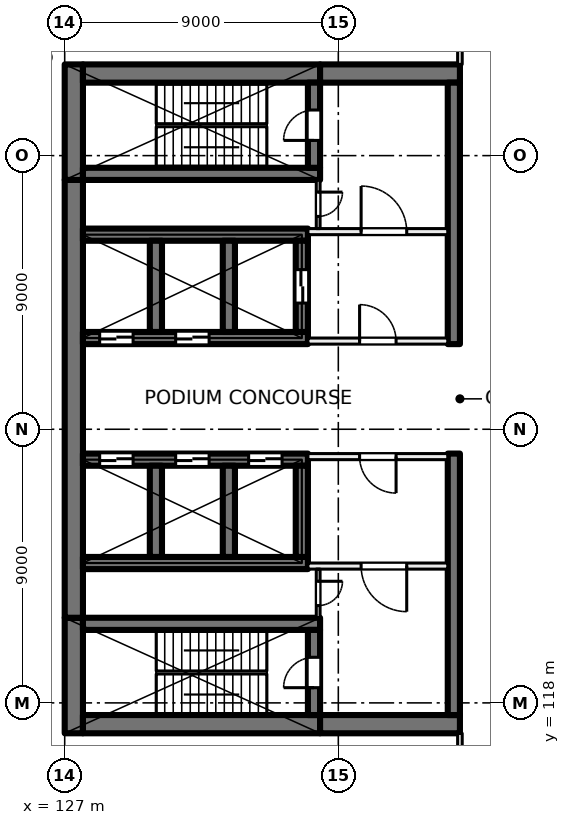
"""IFC4 building model, lengths in metres.
Left out: names, types, materials, properties, quantities, classifications, styles, units other than length and angle.
Written with IfcOpenShell. Run it as: python <this file> out.ifc"""

import sys

from ifc_helpers import new_model, si_unit, direction, frame, frame_2d, origin, place, context, subcontext, project, spatial, rectangle, extrude, element, fill, save


model = new_model("IFC4")
c1 = context("Model", 3, precision=1e-05, world=origin(), true_north=direction((0.0, 1.0)))
c2 = subcontext(c1, "Body", "Model", "MODEL_VIEW")
j1 = project(units=[si_unit("LENGTHUNIT", "METRE"), si_unit("PLANEANGLEUNIT", "RADIAN")], contexts=[c1])
p1 = place(None, origin())
s1 = spatial("IfcSite", under=j1, at=p1, CompositionType="ELEMENT")
p2 = place(p1, origin())
s2 = spatial("IfcBuilding", under=s1, at=p2, CompositionType="ELEMENT")
p3 = place(p2, frame((0.0, 0.0, 17.5)))
s3 = spatial("IfcBuildingStorey", under=s2, at=p3, CompositionType="ELEMENT", Elevation=17.5)
p4 = place(p3, frame((127.3, 117.0, 0.0), z_axis=(0.0, 0.0, 1.0), x_axis=(0.0, 1.0, 0.0)))
e1 = element("IfcWall", 1, at=p4, inside=s3, PredefinedType="SHEAR", context=c2, shape_type="SweptSolid", body=[
    extrude(rectangle(XDim=3.8, YDim=0.6, at=frame_2d((1.9, 0.0))), origin(), (0.0, 0.0, 1.0), 5.0),
])
p5 = place(p3, frame((127.3, 120.8, 0.0), z_axis=(0.0, 0.0, 1.0), x_axis=(0.0, 1.0, 0.0)))
e2 = element("IfcWall", 2, at=p5, inside=s3, PredefinedType="SHEAR", context=c2, shape_type="SweptSolid", body=[
    extrude(rectangle(XDim=14.4, YDim=0.6, at=frame_2d((7.2, 0.0))), origin(), (0.0, 0.0, 1.0), 5.0),
])
p6 = place(p3, frame((127.3, 135.2, 0.0), z_axis=(0.0, 0.0, 1.0), x_axis=(0.0, 1.0, 0.0)))
e3 = element("IfcWall", 3, at=p6, inside=s3, PredefinedType="SHEAR", context=c2, shape_type="SweptSolid", body=[
    extrude(rectangle(XDim=3.8, YDim=0.6, at=frame_2d((1.9, 0.0))), origin(), (0.0, 0.0, 1.0), 5.0),
])
for number, where, z_axis, x_axis in (
    (4, (127.6, 117.3, 0.0), (0.0, 0.0, 1.0), (1.0, 0.0, 0.0)),
    (5, (127.6, 138.7, 0.0), (0.0, 0.0, 1.0), (1.0, 0.0, 0.0)),
):
    element("IfcWall", number, at=place(p3, frame(where, z_axis=z_axis, x_axis=x_axis)), inside=s3, PredefinedType="SHEAR", context=c2, shape_type="SweptSolid", body=[
        extrude(rectangle(XDim=7.8, YDim=0.6, at=frame_2d((3.9, 0.0))), origin(), (0.0, 0.0, 1.0), 5.0),
    ])
for number, where, z_axis, x_axis in (
    (6, (135.4, 117.3, 0.0), (0.0, 0.0, 1.0), (1.0, 0.0, 0.0)),
    (7, (135.4, 138.7, 0.0), (0.0, 0.0, 1.0), (1.0, 0.0, 0.0)),
):
    element("IfcWall", number, at=place(p3, frame(where, z_axis=z_axis, x_axis=x_axis)), inside=s3, PredefinedType="SHEAR", context=c2, shape_type="SweptSolid", body=[
        extrude(rectangle(XDim=4.6, YDim=0.6, at=frame_2d((2.3, 0.0))), origin(), (0.0, 0.0, 1.0), 5.0),
    ])
p7 = place(p3, frame((127.6, 120.6, 0.0), z_axis=(0.0, 0.0, 1.0), x_axis=(1.0, 0.0, 0.0)))
e8 = element("IfcWall", 8, at=p7, inside=s3, PredefinedType="SHEAR", context=c2, shape_type="SweptSolid", body=[
    extrude(rectangle(XDim=7.8, YDim=0.4, at=frame_2d((3.9, 0.0))), origin(), (0.0, 0.0, 1.0), 5.0),
])
p8 = place(p3, frame((135.2, 117.6, 0.0), z_axis=(0.0, 0.0, 1.0), x_axis=(0.0, 1.0, 0.0)))
e9 = element("IfcWall", 9, at=p8, inside=s3, PredefinedType="SHEAR", context=c2, shape_type="SweptSolid", body=[
    extrude(rectangle(XDim=2.8, YDim=0.4, at=frame_2d((1.4, 0.0))), origin(), (0.0, 0.0, 1.0), 5.0),
])
p9 = place(p8, frame((0.9, 0.0, 0.0)))
e10 = element("IfcOpeningElement", 10, at=p9, cuts=e9, PredefinedType="OPENING", context=c2, shape_type="SweptSolid", body=[
    extrude(rectangle(XDim=1.0, YDim=2.1, at=frame_2d((0.5, 1.05))), frame((0.0, 0.21, 0.0), z_axis=(0.0, -1.0, 0.0), x_axis=(1.0, 0.0, 0.0)), (0.0, 0.0, 1.0), 0.42),
])
p10 = place(p3, frame((127.6, 135.4, 0.0), z_axis=(0.0, 0.0, 1.0), x_axis=(1.0, 0.0, 0.0)))
e11 = element("IfcWall", 11, at=p10, inside=s3, PredefinedType="SHEAR", context=c2, shape_type="SweptSolid", body=[
    extrude(rectangle(XDim=7.8, YDim=0.4, at=frame_2d((3.9, 0.0))), origin(), (0.0, 0.0, 1.0), 5.0),
])
p11 = place(p3, frame((135.2, 135.6, 0.0), z_axis=(0.0, 0.0, 1.0), x_axis=(0.0, 1.0, 0.0)))
e12 = element("IfcWall", 12, at=p11, inside=s3, PredefinedType="SHEAR", context=c2, shape_type="SweptSolid", body=[
    extrude(rectangle(XDim=2.8, YDim=0.4, at=frame_2d((1.4, 0.0))), origin(), (0.0, 0.0, 1.0), 5.0),
])
p12 = place(p11, frame((0.9, 0.0, 0.0)))
e13 = element("IfcOpeningElement", 13, at=p12, cuts=e12, PredefinedType="OPENING", context=c2, shape_type="SweptSolid", body=[
    extrude(rectangle(XDim=1.0, YDim=2.1, at=frame_2d((0.5, 1.05))), frame((0.0, 0.21, 0.0), z_axis=(0.0, -1.0, 0.0), x_axis=(1.0, 0.0, 0.0)), (0.0, 0.0, 1.0), 0.42),
])
p13 = place(p3, frame((127.6, 126.0, 0.0), z_axis=(0.0, 0.0, 1.0), x_axis=(1.0, 0.0, 0.0)))
e14 = element("IfcWall", 14, at=p13, inside=s3, PredefinedType="SHEAR", context=c2, shape_type="SweptSolid", body=[
    extrude(rectangle(XDim=7.4, YDim=0.4, at=frame_2d((3.7, 0.0))), origin(), (0.0, 0.0, 1.0), 5.0),
])
p14 = place(p13, frame((0.55, 0.0, 0.0)))
e15 = element("IfcOpeningElement", 15, at=p14, cuts=e14, PredefinedType="OPENING", context=c2, shape_type="SweptSolid", body=[
    extrude(rectangle(XDim=1.1, YDim=2.1, at=frame_2d((0.55, 1.05))), frame((0.0, 0.21, 0.0), z_axis=(0.0, -1.0, 0.0), x_axis=(1.0, 0.0, 0.0)), (0.0, 0.0, 1.0), 0.42),
])
p15 = place(p13, frame((3.05, 0.0, 0.0)))
e16 = element("IfcOpeningElement", 16, at=p15, cuts=e14, PredefinedType="OPENING", context=c2, shape_type="SweptSolid", body=[
    extrude(rectangle(XDim=1.1, YDim=2.1, at=frame_2d((0.55, 1.05))), frame((0.0, 0.21, 0.0), z_axis=(0.0, -1.0, 0.0), x_axis=(1.0, 0.0, 0.0)), (0.0, 0.0, 1.0), 0.42),
])
p16 = place(p13, frame((5.45, 0.0, 0.0)))
e17 = element("IfcOpeningElement", 17, at=p16, cuts=e14, PredefinedType="OPENING", context=c2, shape_type="SweptSolid", body=[
    extrude(rectangle(XDim=1.1, YDim=2.1, at=frame_2d((0.55, 1.05))), frame((0.0, 0.21, 0.0), z_axis=(0.0, -1.0, 0.0), x_axis=(1.0, 0.0, 0.0)), (0.0, 0.0, 1.0), 0.42),
])
p17 = place(p3, frame((127.6, 122.6, 0.0), z_axis=(0.0, 0.0, 1.0), x_axis=(1.0, 0.0, 0.0)))
e18 = element("IfcWall", 18, at=p17, inside=s3, PredefinedType="SHEAR", context=c2, shape_type="SweptSolid", body=[
    extrude(rectangle(XDim=7.4, YDim=0.4, at=frame_2d((3.7, 0.0))), origin(), (0.0, 0.0, 1.0), 5.0),
])
for number, where, z_axis, x_axis in (
    (19, (130.0, 122.8, 0.0), (0.0, 0.0, 1.0), (0.0, 1.0, 0.0)),
    (20, (132.4, 122.8, 0.0), (0.0, 0.0, 1.0), (0.0, 1.0, 0.0)),
    (21, (134.8, 122.8, 0.0), (0.0, 0.0, 1.0), (0.0, 1.0, 0.0)),
):
    element("IfcWall", number, at=place(p3, frame(where, z_axis=z_axis, x_axis=x_axis)), inside=s3, PredefinedType="SHEAR", context=c2, shape_type="SweptSolid", body=[
        extrude(rectangle(XDim=3.0, YDim=0.4, at=frame_2d((1.5, 0.0))), origin(), (0.0, 0.0, 1.0), 5.0),
    ])
p18 = place(p3, frame((127.6, 130.0, 0.0), z_axis=(0.0, 0.0, 1.0), x_axis=(1.0, 0.0, 0.0)))
e22 = element("IfcWall", 22, at=p18, inside=s3, PredefinedType="SHEAR", context=c2, shape_type="SweptSolid", body=[
    extrude(rectangle(XDim=7.4, YDim=0.4, at=frame_2d((3.7, 0.0))), origin(), (0.0, 0.0, 1.0), 5.0),
])
p19 = place(p18, frame((0.55, 0.0, 0.0)))
e23 = element("IfcOpeningElement", 23, at=p19, cuts=e22, PredefinedType="OPENING", context=c2, shape_type="SweptSolid", body=[
    extrude(rectangle(XDim=1.1, YDim=2.1, at=frame_2d((0.55, 1.05))), frame((0.0, 0.21, 0.0), z_axis=(0.0, -1.0, 0.0), x_axis=(1.0, 0.0, 0.0)), (0.0, 0.0, 1.0), 0.42),
])
p20 = place(p18, frame((3.05, 0.0, 0.0)))
e24 = element("IfcOpeningElement", 24, at=p20, cuts=e22, PredefinedType="OPENING", context=c2, shape_type="SweptSolid", body=[
    extrude(rectangle(XDim=1.1, YDim=2.1, at=frame_2d((0.55, 1.05))), frame((0.0, 0.21, 0.0), z_axis=(0.0, -1.0, 0.0), x_axis=(1.0, 0.0, 0.0)), (0.0, 0.0, 1.0), 0.42),
])
p21 = place(p3, frame((127.6, 133.4, 0.0), z_axis=(0.0, 0.0, 1.0), x_axis=(1.0, 0.0, 0.0)))
e25 = element("IfcWall", 25, at=p21, inside=s3, PredefinedType="SHEAR", context=c2, shape_type="SweptSolid", body=[
    extrude(rectangle(XDim=7.4, YDim=0.4, at=frame_2d((3.7, 0.0))), origin(), (0.0, 0.0, 1.0), 5.0),
])
for number, where, z_axis, x_axis in (
    (26, (130.0, 130.2, 0.0), (0.0, 0.0, 1.0), (0.0, 1.0, 0.0)),
    (27, (132.4, 130.2, 0.0), (0.0, 0.0, 1.0), (0.0, 1.0, 0.0)),
):
    element("IfcWall", number, at=place(p3, frame(where, z_axis=z_axis, x_axis=x_axis)), inside=s3, PredefinedType="SHEAR", context=c2, shape_type="SweptSolid", body=[
        extrude(rectangle(XDim=3.0, YDim=0.4, at=frame_2d((1.5, 0.0))), origin(), (0.0, 0.0, 1.0), 5.0),
    ])
p22 = place(p3, frame((134.8, 130.2, 0.0), z_axis=(0.0, 0.0, 1.0), x_axis=(0.0, 1.0, 0.0)))
e28 = element("IfcWall", 28, at=p22, inside=s3, PredefinedType="SHEAR", context=c2, shape_type="SweptSolid", body=[
    extrude(rectangle(XDim=3.0, YDim=0.4, at=frame_2d((1.5, 0.0))), origin(), (0.0, 0.0, 1.0), 5.0),
])
p23 = place(p22, frame((0.95, 0.0, 0.0)))
e29 = element("IfcOpeningElement", 29, at=p23, cuts=e28, PredefinedType="OPENING", context=c2, shape_type="SweptSolid", body=[
    extrude(rectangle(XDim=1.1, YDim=2.1, at=frame_2d((0.55, 1.05))), frame((0.0, 0.21, 0.0), z_axis=(0.0, -1.0, 0.0), x_axis=(1.0, 0.0, 0.0)), (0.0, 0.0, 1.0), 0.42),
])
for number, where, z_axis, x_axis in (
    (30, (139.8, 117.6, 0.0), (0.0, 0.0, 1.0), (0.0, 1.0, 0.0)),
    (31, (139.8, 129.8, 0.0), (0.0, 0.0, 1.0), (0.0, 1.0, 0.0)),
):
    element("IfcWall", number, at=place(p3, frame(where, z_axis=z_axis, x_axis=x_axis)), inside=s3, PredefinedType="SHEAR", context=c2, shape_type="SweptSolid", body=[
        extrude(rectangle(XDim=8.6, YDim=0.4, at=frame_2d((4.3, 0.0))), origin(), (0.0, 0.0, 1.0), 5.0),
    ])
p24 = place(p3, frame((135.0, 129.9, 0.0), z_axis=(0.0, 0.0, 1.0), x_axis=(1.0, 0.0, 0.0)))
e32 = element("IfcWall", 32, at=p24, inside=s3, PredefinedType="PARTITIONING", context=c2, shape_type="SweptSolid", body=[
    extrude(rectangle(XDim=4.6, YDim=0.2, at=frame_2d((2.3, 0.0))), origin(), (0.0, 0.0, 1.0), 4.6),
])
p25 = place(p24, frame((1.7, 0.0, 0.0)))
e33 = element("IfcOpeningElement", 33, at=p25, cuts=e32, PredefinedType="OPENING", context=c2, shape_type="SweptSolid", body=[
    extrude(rectangle(XDim=1.2, YDim=2.1, at=frame_2d((0.6, 1.05))), frame((0.0, 0.11, 0.0), z_axis=(0.0, -1.0, 0.0), x_axis=(1.0, 0.0, 0.0)), (0.0, 0.0, 1.0), 0.22),
])
p26 = place(p3, frame((135.0, 133.5, 0.0), z_axis=(0.0, 0.0, 1.0), x_axis=(1.0, 0.0, 0.0)))
e34 = element("IfcWall", 34, at=p26, inside=s3, PredefinedType="PARTITIONING", context=c2, shape_type="SweptSolid", body=[
    extrude(rectangle(XDim=4.6, YDim=0.2, at=frame_2d((2.3, 0.0))), origin(), (0.0, 0.0, 1.0), 4.6),
])
p27 = place(p26, frame((1.75, 0.0, 0.0)))
e35 = element("IfcOpeningElement", 35, at=p27, cuts=e34, PredefinedType="OPENING", context=c2, shape_type="SweptSolid", body=[
    extrude(rectangle(XDim=1.5, YDim=2.1, at=frame_2d((0.75, 1.05))), frame((0.0, 0.11, 0.0), z_axis=(0.0, -1.0, 0.0), x_axis=(1.0, 0.0, 0.0)), (0.0, 0.0, 1.0), 0.22),
])
p28 = place(p3, frame((135.337, 135.2, 0.0), z_axis=(0.0, 0.0, 1.0), x_axis=(0.0, -1.0, 0.0)))
e36 = element("IfcWall", 36, at=p28, inside=s3, PredefinedType="PARTITIONING", context=c2, shape_type="SweptSolid", body=[
    extrude(rectangle(XDim=1.6, YDim=0.125, at=frame_2d((0.8, 0.0))), origin(), (0.0, 0.0, 1.0), 4.6),
])
p29 = place(p28, frame((0.4, 0.0, 0.0)))
e37 = element("IfcOpeningElement", 37, at=p29, cuts=e36, PredefinedType="OPENING", context=c2, shape_type="SweptSolid", body=[
    extrude(rectangle(XDim=0.8, YDim=2.1, at=frame_2d((0.4, 1.05))), frame((0.0, 0.073, 0.0), z_axis=(0.0, -1.0, 0.0), x_axis=(1.0, 0.0, 0.0)), (0.0, 0.0, 1.0), 0.145),
])
p30 = place(p3, frame((139.6, 126.1, 0.0), z_axis=(0.0, 0.0, 1.0), x_axis=(-1.0, 0.0, 0.0)))
e38 = element("IfcWall", 38, at=p30, inside=s3, PredefinedType="PARTITIONING", context=c2, shape_type="SweptSolid", body=[
    extrude(rectangle(XDim=4.6, YDim=0.2, at=frame_2d((2.3, 0.0))), origin(), (0.0, 0.0, 1.0), 4.6),
])
p31 = place(p30, frame((1.7, 0.0, 0.0)))
e39 = element("IfcOpeningElement", 39, at=p31, cuts=e38, PredefinedType="OPENING", context=c2, shape_type="SweptSolid", body=[
    extrude(rectangle(XDim=1.2, YDim=2.1, at=frame_2d((0.6, 1.05))), frame((0.0, 0.11, 0.0), z_axis=(0.0, -1.0, 0.0), x_axis=(1.0, 0.0, 0.0)), (0.0, 0.0, 1.0), 0.22),
])
p32 = place(p3, frame((139.6, 122.5, 0.0), z_axis=(0.0, 0.0, 1.0), x_axis=(-1.0, 0.0, 0.0)))
e40 = element("IfcWall", 40, at=p32, inside=s3, PredefinedType="PARTITIONING", context=c2, shape_type="SweptSolid", body=[
    extrude(rectangle(XDim=4.6, YDim=0.2, at=frame_2d((2.3, 0.0))), origin(), (0.0, 0.0, 1.0), 4.6),
])
p33 = place(p32, frame((1.35, 0.0, 0.0)))
e41 = element("IfcOpeningElement", 41, at=p33, cuts=e40, PredefinedType="OPENING", context=c2, shape_type="SweptSolid", body=[
    extrude(rectangle(XDim=1.5, YDim=2.1, at=frame_2d((0.75, 1.05))), frame((0.0, 0.11, 0.0), z_axis=(0.0, -1.0, 0.0), x_axis=(1.0, 0.0, 0.0)), (0.0, 0.0, 1.0), 0.22),
])
p34 = place(p3, frame((135.337, 122.4, 0.0), z_axis=(0.0, 0.0, 1.0), x_axis=(0.0, -1.0, 0.0)))
e42 = element("IfcWall", 42, at=p34, inside=s3, PredefinedType="PARTITIONING", context=c2, shape_type="SweptSolid", body=[
    extrude(rectangle(XDim=1.6, YDim=0.125, at=frame_2d((0.8, 0.0))), origin(), (0.0, 0.0, 1.0), 4.6),
])
p35 = place(p34, frame((0.4, 0.0, 0.0)))
e43 = element("IfcOpeningElement", 43, at=p35, cuts=e42, PredefinedType="OPENING", context=c2, shape_type="SweptSolid", body=[
    extrude(rectangle(XDim=0.8, YDim=2.1, at=frame_2d((0.4, 1.05))), frame((0.0, 0.073, 0.0), z_axis=(0.0, -1.0, 0.0), x_axis=(1.0, 0.0, 0.0)), (0.0, 0.0, 1.0), 0.145),
])
p36 = place(p3, frame((140.0, 102.925, 0.0), z_axis=(0.0, 0.0, 1.0), x_axis=(0.0, 1.0, 0.0)))
e44 = element("IfcWall", 44, at=p36, inside=s3, PredefinedType="PARTITIONING", context=c2, shape_type="SweptSolid", body=[
    extrude(rectangle(XDim=14.075, YDim=0.15, at=frame_2d((7.038, 0.0))), origin(), (0.0, 0.0, 1.0), 4.6),
])
p37 = place(p36, frame((10.675, 0.0, 0.0)))
e45 = element("IfcOpeningElement", 45, at=p37, cuts=e44, PredefinedType="OPENING", context=c2, shape_type="SweptSolid", body=[
    extrude(rectangle(XDim=1.8, YDim=2.1, at=frame_2d((0.9, 1.05))), frame((0.0, 0.085, 0.0), z_axis=(0.0, -1.0, 0.0), x_axis=(1.0, 0.0, 0.0)), (0.0, 0.0, 1.0), 0.17),
])
p38 = place(p3, frame((140.0, 139.0, 0.0), z_axis=(0.0, 0.0, 1.0), x_axis=(0.0, 1.0, 0.0)))
e46 = element("IfcWall", 46, at=p38, inside=s3, PredefinedType="PARTITIONING", context=c2, shape_type="SweptSolid", body=[
    extrude(rectangle(XDim=14.4, YDim=0.15, at=frame_2d((7.2, 0.0))), origin(), (0.0, 0.0, 1.0), 4.6),
])
p39 = place(p19, origin())
e47 = element("IfcDoor", 47, at=p39, inside=s3, OperationType="DOUBLE_DOOR_SLIDING", PredefinedType="DOOR", context=c2, shape_type="SweptSolid", body=[
    extrude(rectangle(XDim=1.1, YDim=2.1, at=frame_2d((0.55, 1.05))), frame((0.0, 0.025, 0.0), z_axis=(0.0, -1.0, 0.0), x_axis=(1.0, 0.0, 0.0)), (0.0, 0.0, 1.0), 0.05),
])
fill(e23, e47)
p40 = place(p20, origin())
e48 = element("IfcDoor", 48, at=p40, inside=s3, OperationType="DOUBLE_DOOR_SLIDING", PredefinedType="DOOR", context=c2, shape_type="SweptSolid", body=[
    extrude(rectangle(XDim=1.1, YDim=2.1, at=frame_2d((0.55, 1.05))), frame((0.0, 0.025, 0.0), z_axis=(0.0, -1.0, 0.0), x_axis=(1.0, 0.0, 0.0)), (0.0, 0.0, 1.0), 0.05),
])
fill(e24, e48)
p41 = place(p14, origin())
e49 = element("IfcDoor", 49, at=p41, inside=s3, OperationType="DOUBLE_DOOR_SLIDING", PredefinedType="DOOR", context=c2, shape_type="SweptSolid", body=[
    extrude(rectangle(XDim=1.1, YDim=2.1, at=frame_2d((0.55, 1.05))), frame((0.0, 0.025, 0.0), z_axis=(0.0, -1.0, 0.0), x_axis=(1.0, 0.0, 0.0)), (0.0, 0.0, 1.0), 0.05),
])
fill(e15, e49)
p42 = place(p15, origin())
e50 = element("IfcDoor", 50, at=p42, inside=s3, OperationType="DOUBLE_DOOR_SLIDING", PredefinedType="DOOR", context=c2, shape_type="SweptSolid", body=[
    extrude(rectangle(XDim=1.1, YDim=2.1, at=frame_2d((0.55, 1.05))), frame((0.0, 0.025, 0.0), z_axis=(0.0, -1.0, 0.0), x_axis=(1.0, 0.0, 0.0)), (0.0, 0.0, 1.0), 0.05),
])
fill(e16, e50)
p43 = place(p16, origin())
e51 = element("IfcDoor", 51, at=p43, inside=s3, OperationType="DOUBLE_DOOR_SLIDING", PredefinedType="DOOR", context=c2, shape_type="SweptSolid", body=[
    extrude(rectangle(XDim=1.1, YDim=2.1, at=frame_2d((0.55, 1.05))), frame((0.0, 0.025, 0.0), z_axis=(0.0, -1.0, 0.0), x_axis=(1.0, 0.0, 0.0)), (0.0, 0.0, 1.0), 0.05),
])
fill(e17, e51)
p44 = place(p25, origin())
e52 = element("IfcDoor", 52, at=p44, inside=s3, OperationType="DOUBLE_DOOR_SINGLE_SWING", PredefinedType="DOOR", context=c2, shape_type="SweptSolid", body=[
    extrude(rectangle(XDim=1.2, YDim=2.1, at=frame_2d((0.6, 1.05))), frame((0.0, 0.025, 0.0), z_axis=(0.0, -1.0, 0.0), x_axis=(1.0, 0.0, 0.0)), (0.0, 0.0, 1.0), 0.05),
])
fill(e33, e52)
p45 = place(p27, origin())
e53 = element("IfcDoor", 53, at=p45, inside=s3, OperationType="DOUBLE_DOOR_SINGLE_SWING", PredefinedType="DOOR", context=c2, shape_type="SweptSolid", body=[
    extrude(rectangle(XDim=1.5, YDim=2.1, at=frame_2d((0.75, 1.05))), frame((0.0, 0.025, 0.0), z_axis=(0.0, -1.0, 0.0), x_axis=(1.0, 0.0, 0.0)), (0.0, 0.0, 1.0), 0.05),
])
fill(e35, e53)
p46 = place(p12, origin())
e54 = element("IfcDoor", 54, at=p46, inside=s3, OperationType="SINGLE_SWING_LEFT", PredefinedType="DOOR", context=c2, shape_type="SweptSolid", body=[
    extrude(rectangle(XDim=1.0, YDim=2.1, at=frame_2d((0.5, 1.05))), frame((0.0, 0.025, 0.0), z_axis=(0.0, -1.0, 0.0), x_axis=(1.0, 0.0, 0.0)), (0.0, 0.0, 1.0), 0.05),
])
fill(e13, e54)
p47 = place(p29, origin())
e55 = element("IfcDoor", 55, at=p47, inside=s3, OperationType="SINGLE_SWING_RIGHT", PredefinedType="DOOR", context=c2, shape_type="SweptSolid", body=[
    extrude(rectangle(XDim=0.8, YDim=2.1, at=frame_2d((0.4, 1.05))), frame((0.0, 0.025, 0.0), z_axis=(0.0, -1.0, 0.0), x_axis=(1.0, 0.0, 0.0)), (0.0, 0.0, 1.0), 0.05),
])
fill(e37, e55)
p48 = place(p31, origin())
e56 = element("IfcDoor", 56, at=p48, inside=s3, OperationType="DOUBLE_DOOR_SINGLE_SWING", PredefinedType="DOOR", context=c2, shape_type="SweptSolid", body=[
    extrude(rectangle(XDim=1.2, YDim=2.1, at=frame_2d((0.6, 1.05))), frame((0.0, 0.025, 0.0), z_axis=(0.0, -1.0, 0.0), x_axis=(1.0, 0.0, 0.0)), (0.0, 0.0, 1.0), 0.05),
])
fill(e39, e56)
p49 = place(p33, origin())
e57 = element("IfcDoor", 57, at=p49, inside=s3, OperationType="DOUBLE_DOOR_SINGLE_SWING", PredefinedType="DOOR", context=c2, shape_type="SweptSolid", body=[
    extrude(rectangle(XDim=1.5, YDim=2.1, at=frame_2d((0.75, 1.05))), frame((0.0, 0.025, 0.0), z_axis=(0.0, -1.0, 0.0), x_axis=(1.0, 0.0, 0.0)), (0.0, 0.0, 1.0), 0.05),
])
fill(e41, e57)
p50 = place(p9, origin())
e58 = element("IfcDoor", 58, at=p50, inside=s3, OperationType="SINGLE_SWING_RIGHT", PredefinedType="DOOR", context=c2, shape_type="SweptSolid", body=[
    extrude(rectangle(XDim=1.0, YDim=2.1, at=frame_2d((0.5, 1.05))), frame((0.0, 0.025, 0.0), z_axis=(0.0, -1.0, 0.0), x_axis=(1.0, 0.0, 0.0)), (0.0, 0.0, 1.0), 0.05),
])
fill(e10, e58)
p51 = place(p35, origin())
e59 = element("IfcDoor", 59, at=p51, inside=s3, OperationType="SINGLE_SWING_LEFT", PredefinedType="DOOR", context=c2, shape_type="SweptSolid", body=[
    extrude(rectangle(XDim=0.8, YDim=2.1, at=frame_2d((0.4, 1.05))), frame((0.0, 0.025, 0.0), z_axis=(0.0, -1.0, 0.0), x_axis=(1.0, 0.0, 0.0)), (0.0, 0.0, 1.0), 0.05),
])
fill(e43, e59)
p52 = place(p23, origin())
e60 = element("IfcDoor", 60, at=p52, inside=s3, OperationType="DOUBLE_DOOR_SLIDING", PredefinedType="DOOR", context=c2, shape_type="SweptSolid", body=[
    extrude(rectangle(XDim=1.1, YDim=2.1, at=frame_2d((0.55, 1.05))), frame((0.0, 0.025, 0.0), z_axis=(0.0, -1.0, 0.0), x_axis=(1.0, 0.0, 0.0)), (0.0, 0.0, 1.0), 0.05),
])
fill(e29, e60)
save(model, sys.argv[1])
